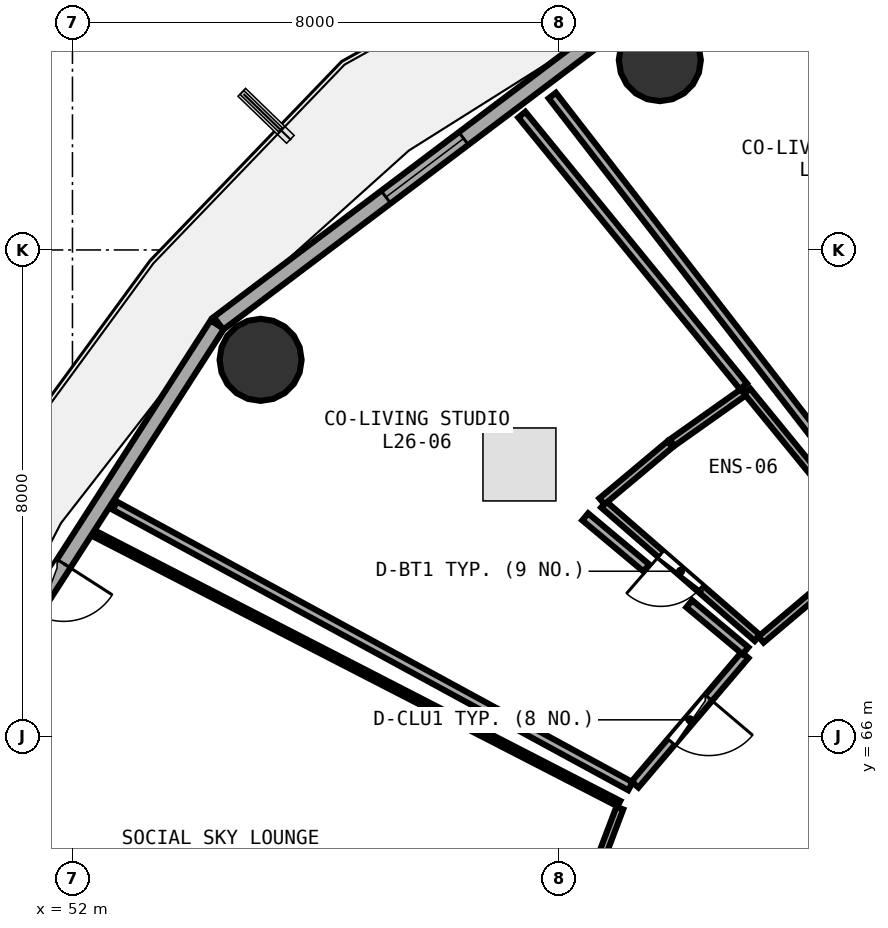
"""IFC4 building model, lengths in metres.
Left out: names, types, materials, properties, quantities, classifications, styles, units other than length and angle.
Written with IfcOpenShell. Run it as: python <this file> out.ifc"""

import sys

from ifc_helpers import new_model, si_unit, direction, frame, frame_2d, origin, origin_2d, place, context, subcontext, project, spatial, rectangle, circle, extrude, element, fill, save


model = new_model("IFC4")
c1 = context("Model", 3, precision=1e-05, world=origin(), true_north=direction((0.0, 1.0)))
c2 = subcontext(c1, "Body", "Model", "MODEL_VIEW")
j1 = project(units=[si_unit("LENGTHUNIT", "METRE"), si_unit("PLANEANGLEUNIT", "RADIAN")], contexts=[c1])
p1 = place(None, origin())
s1 = spatial("IfcSite", under=j1, at=p1, CompositionType="ELEMENT")
p2 = place(p1, origin())
s2 = spatial("IfcBuilding", under=s1, at=p2, CompositionType="ELEMENT")
p3 = place(p2, frame((0.0, 0.0, 102.6)))
s3 = spatial("IfcBuildingStorey", under=s2, at=p3, CompositionType="ELEMENT", Elevation=102.6)
for number, where, z_axis, x_axis in (
    (1, (61.66, 77.122, 0.0), (0.0, 0.0, 1.0), (1.0, 0.0, 0.0)),
    (2, (55.094, 72.193, 0.0), (0.0, 0.0, 1.0), (1.0, 0.0, 0.0)),
):
    element("IfcColumn", number, at=place(p3, frame(where, z_axis=z_axis, x_axis=x_axis)), inside=s3, PredefinedType="COLUMN", context=c2, shape_type="SweptSolid", body=[
        extrude(circle(Radius=0.675, at=origin_2d()), origin(), (0.0, 0.0, 1.0), 3.75),
    ])
p4 = place(p3, frame((61.188, 77.91, 0.0), z_axis=(0.0, 0.0, 1.0), x_axis=(-0.798501507879, -0.601992808857, 0.0)))
e3 = element("IfcWall", 3, at=p4, inside=s3, PredefinedType="SOLIDWALL", context=c2, shape_type="SweptSolid", body=[
    extrude(rectangle(XDim=8.499, YDim=0.26, at=frame_2d((4.25, 0.0))), origin(), (0.0, 0.0, 1.0), 3.475),
])
p5 = place(p4, frame((3.45, 0.0, 0.85)))
e4 = element("IfcOpeningElement", 4, at=p5, cuts=e3, PredefinedType="OPENING", context=c2, shape_type="SweptSolid", body=[
    extrude(rectangle(XDim=1.6, YDim=1.45, at=frame_2d((0.8, 0.725))), frame((0.0, 0.14, 0.0), z_axis=(0.0, -1.0, 0.0), x_axis=(1.0, 0.0, 0.0)), (0.0, 0.0, 1.0), 0.28),
])
p6 = place(p3, frame((54.381, 72.771, 0.0), z_axis=(0.0, 0.0, 1.0), x_axis=(-0.540620528459, -0.841266571432, 0.0)))
e5 = element("IfcWall", 5, at=p6, inside=s3, PredefinedType="SOLIDWALL", context=c2, shape_type="SweptSolid", body=[
    extrude(rectangle(XDim=8.193, YDim=0.26, at=frame_2d((4.096, 0.0))), origin(), (0.0, 0.0, 1.0), 3.475),
])
p7 = place(p6, frame((4.671, 0.0, 0.0)))
e6 = element("IfcOpeningElement", 6, at=p7, cuts=e5, PredefinedType="OPENING", context=c2, shape_type="SweptSolid", body=[
    extrude(rectangle(XDim=0.95, YDim=2.1, at=frame_2d((0.475, 1.05))), frame((0.0, 0.14, 0.0), z_axis=(0.0, -1.0, 0.0), x_axis=(1.0, 0.0, 0.0)), (0.0, 0.0, 1.0), 0.28),
])
p8 = place(p6, frame((5.971, 0.0, 0.85)))
e7 = element("IfcOpeningElement", 7, at=p8, cuts=e5, PredefinedType="OPENING", context=c2, shape_type="SweptSolid", body=[
    extrude(rectangle(XDim=1.2, YDim=1.45, at=frame_2d((0.6, 0.725))), frame((0.0, 0.14, 0.0), z_axis=(0.0, -1.0, 0.0), x_axis=(1.0, 0.0, 0.0)), (0.0, 0.0, 1.0), 0.28),
])
p9 = place(p3, frame((63.264, 67.619, 0.0), z_axis=(0.0, 0.0, 1.0), x_axis=(-0.75497608509, 0.65575232439, 0.0)))
e8 = element("IfcWall", 8, at=p9, inside=s3, PredefinedType="PLUMBINGWALL", context=c2, shape_type="SweptSolid", body=[
    extrude(rectangle(XDim=3.346, YDim=0.13, at=frame_2d((1.673, 0.0))), origin(), (0.0, 0.0, 1.0), 3.235),
])
p10 = place(p9, frame((1.243, 0.0, 0.0)))
e9 = element("IfcOpeningElement", 9, at=p10, cuts=e8, PredefinedType="OPENING", context=c2, shape_type="SweptSolid", body=[
    extrude(rectangle(XDim=0.86, YDim=2.05, at=frame_2d((0.43, 1.025))), frame((0.0, 0.075, 0.0), z_axis=(0.0, -1.0, 0.0), x_axis=(1.0, 0.0, 0.0)), (0.0, 0.0, 1.0), 0.15),
])
p11 = place(p3, frame((63.06, 67.337, 0.0), z_axis=(0.0, 0.0, 1.0), x_axis=(-0.647519081114, -0.762049236988, 0.0)))
e10 = element("IfcWall", 10, at=p11, inside=s3, PredefinedType="PARTITIONING", context=c2, shape_type="SweptSolid", body=[
    extrude(rectangle(XDim=2.795, YDim=0.15, at=frame_2d((1.397, 0.0))), origin(), (0.0, 0.0, 1.0), 2.925),
])
p12 = place(p11, frame((0.922, 0.0, 0.0)))
e11 = element("IfcOpeningElement", 11, at=p12, cuts=e10, PredefinedType="OPENING", context=c2, shape_type="SweptSolid", body=[
    extrude(rectangle(XDim=0.95, YDim=2.08, at=frame_2d((0.475, 1.04))), frame((0.0, 0.085, 0.0), z_axis=(0.0, -1.0, 0.0), x_axis=(1.0, 0.0, 0.0)), (0.0, 0.0, 1.0), 0.17),
])
p13 = place(p3, frame((61.002, 64.821, 0.0), z_axis=(0.0, 0.0, 1.0), x_axis=(-0.354853458438, -0.934921934193, 0.0)))
e12 = element("IfcWall", 12, at=p13, inside=s3, PredefinedType="PARTITIONING", context=c2, shape_type="SweptSolid", body=[
    extrude(rectangle(XDim=5.282, YDim=0.12, at=frame_2d((2.641, 0.0))), origin(), (0.0, 0.0, 1.0), 3.235),
])
p14 = place(p13, frame((2.191, 0.0, 0.0)))
e13 = element("IfcOpeningElement", 13, at=p14, cuts=e12, PredefinedType="OPENING", context=c2, shape_type="SweptSolid", body=[
    extrude(rectangle(XDim=0.9, YDim=2.08, at=frame_2d((0.45, 1.04))), frame((0.0, 0.07, 0.0), z_axis=(0.0, -1.0, 0.0), x_axis=(1.0, 0.0, 0.0)), (0.0, 0.0, 1.0), 0.14),
])
p15 = place(p3, frame((65.506, 69.292, 0.0), z_axis=(0.0, 0.0, 1.0), x_axis=(-0.612364923916, 0.790575233585, 0.0)))
e14 = element("IfcWall", 14, at=p15, inside=s3, PredefinedType="PARTITIONING", context=c2, shape_type="SweptSolid", body=[
    extrude(rectangle(XDim=9.168, YDim=0.15, at=frame_2d((4.584, 0.0))), origin(), (0.0, 0.0, 1.0), 2.925),
])
p16 = place(p3, frame((64.219, 68.348, 0.0), z_axis=(0.0, 0.0, 1.0), x_axis=(-0.764137277769, -0.645053657244, 0.0)))
e15 = element("IfcWall", 15, at=p16, inside=s3, PredefinedType="PLUMBINGWALL", context=c2, shape_type="SweptSolid", body=[
    extrude(rectangle(XDim=1.171, YDim=0.13, at=frame_2d((0.585, 0.0))), origin(), (0.0, 0.0, 1.0), 3.48),
])
p17 = place(p3, frame((60.707, 69.866, 0.0), z_axis=(0.0, 0.0, 1.0), x_axis=(0.766482767596, 0.642264872913, 0.0)))
e16 = element("IfcWall", 16, at=p17, inside=s3, PredefinedType="PLUMBINGWALL", context=c2, shape_type="SweptSolid", body=[
    extrude(rectangle(XDim=1.464, YDim=0.13, at=frame_2d((0.732, 0.0))), origin(), (0.0, 0.0, 1.0), 3.48),
])
p18 = place(p3, frame((61.861, 70.831, 0.0), z_axis=(0.0, 0.0, 1.0), x_axis=(0.816339578676, 0.577572239886, 0.0)))
e17 = element("IfcWall", 17, at=p18, inside=s3, PredefinedType="PLUMBINGWALL", context=c2, shape_type="SweptSolid", body=[
    extrude(rectangle(XDim=1.477, YDim=0.13, at=frame_2d((0.738, 0.0))), origin(), (0.0, 0.0, 1.0), 3.48),
])
p19 = place(p3, frame((63.096, 71.679, 0.0), z_axis=(0.0, 0.0, 1.0), x_axis=(0.632781461548, -0.774330434583, 0.0)))
e18 = element("IfcWall", 18, at=p19, inside=s3, PredefinedType="PLUMBINGWALL", context=c2, shape_type="SweptSolid", body=[
    extrude(rectangle(XDim=3.351, YDim=0.13, at=frame_2d((1.676, 0.0))), origin(), (0.0, 0.0, 1.0), 2.925),
])
p20 = place(p3, frame((61.177, 65.181, 0.0), z_axis=(0.0, 0.0, 1.0), x_axis=(-0.878445909545, 0.477841798092, 0.0)))
e19 = element("IfcWall", 19, at=p20, inside=s3, PredefinedType="PARTITIONING", context=c2, shape_type="SweptSolid", body=[
    extrude(rectangle(XDim=9.653, YDim=0.15, at=frame_2d((4.827, 0.0))), origin(), (0.0, 0.0, 1.0), 2.925),
])
p21 = place(p3, frame((59.39, 76.225, 0.0), z_axis=(0.0, 0.0, 1.0), x_axis=(0.632139440809, -0.774854649192, 0.0)))
e20 = element("IfcWall", 20, at=p21, inside=s3, PredefinedType="PARTITIONING", context=c2, shape_type="SweptSolid", body=[
    extrude(rectangle(XDim=5.765, YDim=0.15, at=frame_2d((2.882, 0.0))), origin(), (0.0, 0.0, 1.0), 2.975),
])
p22 = place(p3, frame((60.433, 69.611, 0.0), z_axis=(0.0, 0.0, 1.0), x_axis=(0.767335111176, -0.641246307714, 0.0)))
e21 = element("IfcWall", 21, at=p22, inside=s3, PredefinedType="PARTITIONING", context=c2, shape_type="SweptSolid", body=[
    extrude(rectangle(XDim=1.311, YDim=0.15, at=frame_2d((0.655, 0.0))), origin(), (0.0, 0.0, 1.0), 3.48),
])
p23 = place(p3, frame((62.145, 68.181, 0.0), z_axis=(0.0, 0.0, 1.0), x_axis=(0.767356229846, -0.641221035616, 0.0)))
e22 = element("IfcWall", 22, at=p23, inside=s3, PredefinedType="PARTITIONING", context=c2, shape_type="SweptSolid", body=[
    extrude(rectangle(XDim=1.204, YDim=0.15, at=frame_2d((0.602, 0.0))), origin(), (0.0, 0.0, 1.0), 3.235),
])
p24 = place(p3, frame((52.382, 69.324, 0.0), z_axis=(0.0, 0.0, 1.0), x_axis=(0.889175506344, -0.457566300025, 0.0)))
e23 = element("IfcWall", 23, at=p24, inside=s3, PredefinedType="PARTITIONING", context=c2, shape_type="SweptSolid", body=[
    extrude(rectangle(XDim=9.678, YDim=0.1, at=frame_2d((4.839, 0.0))), origin(), (0.0, 0.0, 1.0), 2.925),
])
p25 = place(p5, origin())
e24 = element("IfcWindow", 24, at=p25, inside=s3, PartitioningType="SINGLE_PANEL", PredefinedType="WINDOW", context=c2, shape_type="SweptSolid", body=[
    extrude(rectangle(XDim=1.6, YDim=1.45, at=frame_2d((0.8, 0.725))), frame((0.0, 0.03, 0.0), z_axis=(0.0, -1.0, 0.0), x_axis=(1.0, 0.0, 0.0)), (0.0, 0.0, 1.0), 0.06),
])
fill(e4, e24)
p26 = place(p7, frame((0.95, 0.0, 0.0), z_axis=(0.0, 0.0, 1.0), x_axis=(-1.0, 0.0, 0.0)))
e25 = element("IfcDoor", 25, at=p26, inside=s3, OperationType="SINGLE_SWING_RIGHT", PredefinedType="DOOR", context=c2, shape_type="SweptSolid", body=[
    extrude(rectangle(XDim=0.95, YDim=2.1, at=frame_2d((0.475, 1.05))), frame((0.0, 0.025, 0.0), z_axis=(0.0, -1.0, 0.0), x_axis=(1.0, 0.0, 0.0)), (0.0, 0.0, 1.0), 0.05),
])
fill(e6, e25)
p27 = place(p10, origin())
e26 = element("IfcDoor", 26, at=p27, inside=s3, OperationType="SINGLE_SWING_RIGHT", PredefinedType="DOOR", context=c2, shape_type="SweptSolid", body=[
    extrude(rectangle(XDim=0.86, YDim=2.05, at=frame_2d((0.43, 1.025))), frame((0.0, 0.025, 0.0), z_axis=(0.0, -1.0, 0.0), x_axis=(1.0, 0.0, 0.0)), (0.0, 0.0, 1.0), 0.05),
])
fill(e9, e26)
p28 = place(p12, origin())
e27 = element("IfcDoor", 27, at=p28, inside=s3, OperationType="SINGLE_SWING_LEFT", PredefinedType="DOOR", context=c2, shape_type="SweptSolid", body=[
    extrude(rectangle(XDim=0.95, YDim=2.08, at=frame_2d((0.475, 1.04))), frame((0.0, 0.025, 0.0), z_axis=(0.0, -1.0, 0.0), x_axis=(1.0, 0.0, 0.0)), (0.0, 0.0, 1.0), 0.05),
])
fill(e11, e27)
save(model, sys.argv[1])
